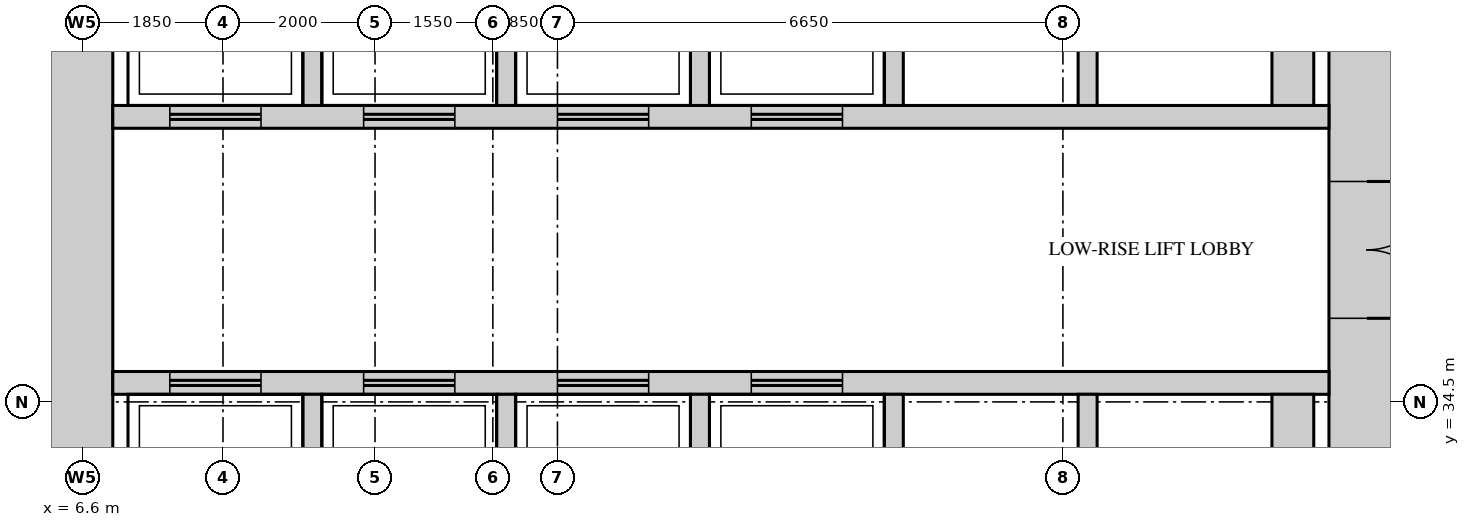
"""IFC4 building model, lengths in metres.
Left out: names, types, materials, properties, quantities, classifications, styles, units other than length and angle.
Written with IfcOpenShell. Run it as: python <this file> out.ifc"""

import sys

from ifc_helpers import new_model, si_unit, direction, frame, frame_2d, origin, place, context, subcontext, project, spatial, rectangle, extrude, source, transform, mapped, element, fill, save


model = new_model("IFC4")
c1 = context("Model", 3, precision=1e-05, world=origin(), true_north=direction((0.0, 1.0)))
c2 = subcontext(c1, "Body", "Model", "MODEL_VIEW")
j1 = project(units=[si_unit("LENGTHUNIT", "METRE"), si_unit("PLANEANGLEUNIT", "RADIAN")], contexts=[c1])
p1 = place(None, origin())
s1 = spatial("IfcSite", under=j1, at=p1, CompositionType="ELEMENT")
p2 = place(p1, origin())
s2 = spatial("IfcBuilding", under=s1, at=p2, CompositionType="ELEMENT")
p3 = place(p2, frame((0.0, 0.0, 105.9)))
s3 = spatial("IfcBuildingStorey", under=s2, at=p3, CompositionType="ELEMENT", Elevation=105.9)
m1 = source(origin(), c2, "Body", "SweptSolid", [
    extrude(rectangle(XDim=28.0, YDim=1.0, at=frame_2d((14.0, 0.0))), origin(), (0.0, 0.0, 1.0), 4.1),
])
p4 = place(p3, frame((23.5, 13.0, 0.0), z_axis=(0.0, 0.0, 1.0), x_axis=(0.0, 1.0, 0.0)))
e1 = element("IfcWall", 1, at=p4, inside=s3, PredefinedType="SHEAR", context=c2, shape_type="MappedRepresentation", body=[
    mapped(m1, transform((0.0, 0.0, 0.0))),
])
m2 = source(origin(), c2, "Body", "SweptSolid", [
    extrude(rectangle(XDim=1.8, YDim=2.1, at=frame_2d((0.9, 1.05))), frame((0.0, 0.51, 0.0), z_axis=(0.0, -1.0, 0.0), x_axis=(1.0, 0.0, 0.0)), (0.0, 0.0, 1.0), 1.02),
])
p5 = place(p4, frame((22.6, 0.0, 0.0)))
e2 = element("IfcOpeningElement", 2, at=p5, cuts=e1, PredefinedType="OPENING", context=c2, shape_type="MappedRepresentation", body=[
    mapped(m2, transform((0.0, 0.0, 0.0))),
])
m3 = source(origin(), c2, "Body", "SweptSolid", [
    extrude(rectangle(XDim=1.2, YDim=2.1, at=frame_2d((0.6, 1.05))), frame((0.0, 0.51, 0.0), z_axis=(0.0, -1.0, 0.0), x_axis=(1.0, 0.0, 0.0)), (0.0, 0.0, 1.0), 1.02),
])
p6 = place(p4, frame((13.85, 0.0, 0.0)))
e3 = element("IfcOpeningElement", 3, at=p6, cuts=e1, PredefinedType="OPENING", context=c2, shape_type="MappedRepresentation", body=[
    mapped(m3, transform((0.0, 0.0, 0.0))),
])
m4 = source(origin(), c2, "Body", "SweptSolid", [
    extrude(rectangle(XDim=0.9, YDim=2.1, at=frame_2d((0.45, 1.05))), frame((0.0, 0.51, 0.0), z_axis=(0.0, -1.0, 0.0), x_axis=(1.0, 0.0, 0.0)), (0.0, 0.0, 1.0), 1.02),
])
p7 = place(p4, frame((1.0, 0.0, 0.0)))
e4 = element("IfcOpeningElement", 4, at=p7, cuts=e1, PredefinedType="OPENING", context=c2, shape_type="MappedRepresentation", body=[
    mapped(m4, transform((0.0, 0.0, 0.0))),
])
p8 = place(p4, frame((4.0, 0.0, 0.0)))
e5 = element("IfcOpeningElement", 5, at=p8, cuts=e1, PredefinedType="OPENING", context=c2, shape_type="MappedRepresentation", body=[
    mapped(m4, transform((0.0, 0.0, 0.0))),
])
p9 = place(p4, frame((7.6, 0.0, 0.0)))
e6 = element("IfcOpeningElement", 6, at=p9, cuts=e1, PredefinedType="OPENING", context=c2, shape_type="MappedRepresentation", body=[
    mapped(m4, transform((0.0, 0.0, 0.0))),
])
p10 = place(p3, frame((6.5, 13.0, 0.0), z_axis=(0.0, 0.0, 1.0), x_axis=(0.0, 1.0, 0.0)))
e7 = element("IfcWall", 7, at=p10, inside=s3, PredefinedType="SHEAR", context=c2, shape_type="MappedRepresentation", body=[
    mapped(m1, transform((0.0, 0.0, 0.0))),
])
m5 = source(origin(), c2, "Body", "SweptSolid", [
    extrude(rectangle(XDim=16.0, YDim=0.3, at=frame_2d((8.0, 0.0))), origin(), (0.0, 0.0, 1.0), 4.1),
])
p11 = place(p3, frame((7.0, 38.25, 0.0), z_axis=(0.0, 0.0, 1.0), x_axis=(1.0, 0.0, 0.0)))
e8 = element("IfcWall", 8, at=p11, inside=s3, PredefinedType="STANDARD", context=c2, shape_type="MappedRepresentation", body=[
    mapped(m5, transform((0.0, 0.0, 0.0))),
])
m6 = source(origin(), c2, "Body", "SweptSolid", [
    extrude(rectangle(XDim=1.2, YDim=2.1, at=frame_2d((0.6, 1.05))), frame((0.0, 0.16, 0.0), z_axis=(0.0, -1.0, 0.0), x_axis=(1.0, 0.0, 0.0)), (0.0, 0.0, 1.0), 0.32),
])
p12 = place(p11, frame((0.75, 0.0, 0.0)))
e9 = element("IfcOpeningElement", 9, at=p12, cuts=e8, PredefinedType="OPENING", context=c2, shape_type="MappedRepresentation", body=[
    mapped(m6, transform((0.0, 0.0, 0.0))),
])
p13 = place(p11, frame((3.3, 0.0, 0.0)))
e10 = element("IfcOpeningElement", 10, at=p13, cuts=e8, PredefinedType="OPENING", context=c2, shape_type="MappedRepresentation", body=[
    mapped(m6, transform((0.0, 0.0, 0.0))),
])
p14 = place(p11, frame((5.85, 0.0, 0.0)))
e11 = element("IfcOpeningElement", 11, at=p14, cuts=e8, PredefinedType="OPENING", context=c2, shape_type="MappedRepresentation", body=[
    mapped(m6, transform((0.0, 0.0, 0.0))),
])
p15 = place(p11, frame((8.4, 0.0, 0.0)))
e12 = element("IfcOpeningElement", 12, at=p15, cuts=e8, PredefinedType="OPENING", context=c2, shape_type="MappedRepresentation", body=[
    mapped(m6, transform((0.0, 0.0, 0.0))),
])
p16 = place(p3, frame((7.0, 34.75, 0.0), z_axis=(0.0, 0.0, 1.0), x_axis=(1.0, 0.0, 0.0)))
e13 = element("IfcWall", 13, at=p16, inside=s3, PredefinedType="STANDARD", context=c2, shape_type="MappedRepresentation", body=[
    mapped(m5, transform((0.0, 0.0, 0.0))),
])
p17 = place(p16, frame((0.75, 0.0, 0.0)))
e14 = element("IfcOpeningElement", 14, at=p17, cuts=e13, PredefinedType="OPENING", context=c2, shape_type="MappedRepresentation", body=[
    mapped(m6, transform((0.0, 0.0, 0.0))),
])
p18 = place(p16, frame((3.3, 0.0, 0.0)))
e15 = element("IfcOpeningElement", 15, at=p18, cuts=e13, PredefinedType="OPENING", context=c2, shape_type="MappedRepresentation", body=[
    mapped(m6, transform((0.0, 0.0, 0.0))),
])
p19 = place(p16, frame((5.85, 0.0, 0.0)))
e16 = element("IfcOpeningElement", 16, at=p19, cuts=e13, PredefinedType="OPENING", context=c2, shape_type="MappedRepresentation", body=[
    mapped(m6, transform((0.0, 0.0, 0.0))),
])
p20 = place(p16, frame((8.4, 0.0, 0.0)))
e17 = element("IfcOpeningElement", 17, at=p20, cuts=e13, PredefinedType="OPENING", context=c2, shape_type="MappedRepresentation", body=[
    mapped(m6, transform((0.0, 0.0, 0.0))),
])
m7 = source(origin(), c2, "Body", "SweptSolid", [
    extrude(rectangle(XDim=2.6, YDim=0.25, at=frame_2d((1.3, 0.0))), origin(), (0.0, 0.0, 1.0), 4.1),
])
for number, where, z_axis, x_axis in (
    (18, (9.625, 38.4, 0.0), (0.0, 0.0, 1.0), (0.0, 1.0, 0.0)),
    (19, (12.175, 38.4, 0.0), (0.0, 0.0, 1.0), (0.0, 1.0, 0.0)),
    (20, (14.725, 38.4, 0.0), (0.0, 0.0, 1.0), (0.0, 1.0, 0.0)),
    (21, (17.275, 38.4, 0.0), (0.0, 0.0, 1.0), (0.0, 1.0, 0.0)),
    (22, (19.825, 38.4, 0.0), (0.0, 0.0, 1.0), (0.0, 1.0, 0.0)),
):
    element("IfcWall", number, at=place(p3, frame(where, z_axis=z_axis, x_axis=x_axis)), inside=s3, PredefinedType="STANDARD", context=c2, shape_type="MappedRepresentation", body=[
        mapped(m7, transform((0.0, 0.0, 0.0))),
    ])
m8 = source(origin(), c2, "Body", "SweptSolid", [
    extrude(rectangle(XDim=2.6, YDim=0.55, at=frame_2d((1.3, 0.0))), origin(), (0.0, 0.0, 1.0), 4.1),
])
p21 = place(p3, frame((22.525, 38.4, 0.0), z_axis=(0.0, 0.0, 1.0), x_axis=(0.0, 1.0, 0.0)))
e23 = element("IfcWall", 23, at=p21, inside=s3, PredefinedType="STANDARD", context=c2, shape_type="MappedRepresentation", body=[
    mapped(m8, transform((0.0, 0.0, 0.0))),
])
m9 = source(origin(), c2, "Body", "SweptSolid", [
    extrude(rectangle(XDim=2.4, YDim=0.25, at=frame_2d((1.2, 0.0))), origin(), (0.0, 0.0, 1.0), 4.1),
])
for number, where, z_axis, x_axis in (
    (24, (9.625, 32.2, 0.0), (0.0, 0.0, 1.0), (0.0, 1.0, 0.0)),
    (25, (12.175, 32.2, 0.0), (0.0, 0.0, 1.0), (0.0, 1.0, 0.0)),
    (26, (14.725, 32.2, 0.0), (0.0, 0.0, 1.0), (0.0, 1.0, 0.0)),
    (27, (17.275, 32.2, 0.0), (0.0, 0.0, 1.0), (0.0, 1.0, 0.0)),
    (28, (19.825, 32.2, 0.0), (0.0, 0.0, 1.0), (0.0, 1.0, 0.0)),
):
    element("IfcWall", number, at=place(p3, frame(where, z_axis=z_axis, x_axis=x_axis)), inside=s3, PredefinedType="STANDARD", context=c2, shape_type="MappedRepresentation", body=[
        mapped(m9, transform((0.0, 0.0, 0.0))),
    ])
m10 = source(origin(), c2, "Body", "SweptSolid", [
    extrude(rectangle(XDim=2.4, YDim=0.55, at=frame_2d((1.2, 0.0))), origin(), (0.0, 0.0, 1.0), 4.1),
])
p22 = place(p3, frame((22.525, 32.2, 0.0), z_axis=(0.0, 0.0, 1.0), x_axis=(0.0, 1.0, 0.0)))
e29 = element("IfcWall", 29, at=p22, inside=s3, PredefinedType="STANDARD", context=c2, shape_type="MappedRepresentation", body=[
    mapped(m10, transform((0.0, 0.0, 0.0))),
])
m11 = source(origin(), c2, "Body", "SweptSolid", [
    extrude(rectangle(XDim=1.8, YDim=2.1, at=frame_2d((0.9, 1.05))), frame((0.0, 0.45, 0.0), z_axis=(0.0, -1.0, 0.0), x_axis=(1.0, 0.0, 0.0)), (0.0, 0.0, 1.0), 0.9),
])
p23 = place(p5, origin())
e30 = element("IfcDoor", 30, at=p23, inside=s3, OperationType="DOUBLE_DOOR_SINGLE_SWING", PredefinedType="DOOR", context=c2, shape_type="MappedRepresentation", body=[
    mapped(m11, transform((0.0, 0.0, 0.0))),
])
fill(e2, e30)
m12 = source(origin(), c2, "Body", "SweptSolid", [
    extrude(rectangle(XDim=1.2, YDim=2.1, at=frame_2d((0.6, 1.05))), frame((0.0, 0.025, 0.0), z_axis=(0.0, -1.0, 0.0), x_axis=(1.0, 0.0, 0.0)), (0.0, 0.0, 1.0), 0.05),
])
p24 = place(p17, origin())
e31 = element("IfcDoor", 31, at=p24, inside=s3, OperationType="DOUBLE_DOOR_SLIDING", PredefinedType="DOOR", context=c2, shape_type="MappedRepresentation", body=[
    mapped(m12, transform((0.0, 0.0, 0.0))),
])
fill(e14, e31)
p25 = place(p18, origin())
e32 = element("IfcDoor", 32, at=p25, inside=s3, OperationType="DOUBLE_DOOR_SLIDING", PredefinedType="DOOR", context=c2, shape_type="MappedRepresentation", body=[
    mapped(m12, transform((0.0, 0.0, 0.0))),
])
fill(e15, e32)
p26 = place(p19, origin())
e33 = element("IfcDoor", 33, at=p26, inside=s3, OperationType="DOUBLE_DOOR_SLIDING", PredefinedType="DOOR", context=c2, shape_type="MappedRepresentation", body=[
    mapped(m12, transform((0.0, 0.0, 0.0))),
])
fill(e16, e33)
p27 = place(p20, origin())
e34 = element("IfcDoor", 34, at=p27, inside=s3, OperationType="DOUBLE_DOOR_SLIDING", PredefinedType="DOOR", context=c2, shape_type="MappedRepresentation", body=[
    mapped(m12, transform((0.0, 0.0, 0.0))),
])
fill(e17, e34)
p28 = place(p12, origin())
e35 = element("IfcDoor", 35, at=p28, inside=s3, OperationType="DOUBLE_DOOR_SLIDING", PredefinedType="DOOR", context=c2, shape_type="MappedRepresentation", body=[
    mapped(m12, transform((0.0, 0.0, 0.0))),
])
fill(e9, e35)
p29 = place(p13, origin())
e36 = element("IfcDoor", 36, at=p29, inside=s3, OperationType="DOUBLE_DOOR_SLIDING", PredefinedType="DOOR", context=c2, shape_type="MappedRepresentation", body=[
    mapped(m12, transform((0.0, 0.0, 0.0))),
])
fill(e10, e36)
p30 = place(p14, origin())
e37 = element("IfcDoor", 37, at=p30, inside=s3, OperationType="DOUBLE_DOOR_SLIDING", PredefinedType="DOOR", context=c2, shape_type="MappedRepresentation", body=[
    mapped(m12, transform((0.0, 0.0, 0.0))),
])
fill(e11, e37)
p31 = place(p15, origin())
e38 = element("IfcDoor", 38, at=p31, inside=s3, OperationType="DOUBLE_DOOR_SLIDING", PredefinedType="DOOR", context=c2, shape_type="MappedRepresentation", body=[
    mapped(m12, transform((0.0, 0.0, 0.0))),
])
fill(e12, e38)
save(model, sys.argv[1])
